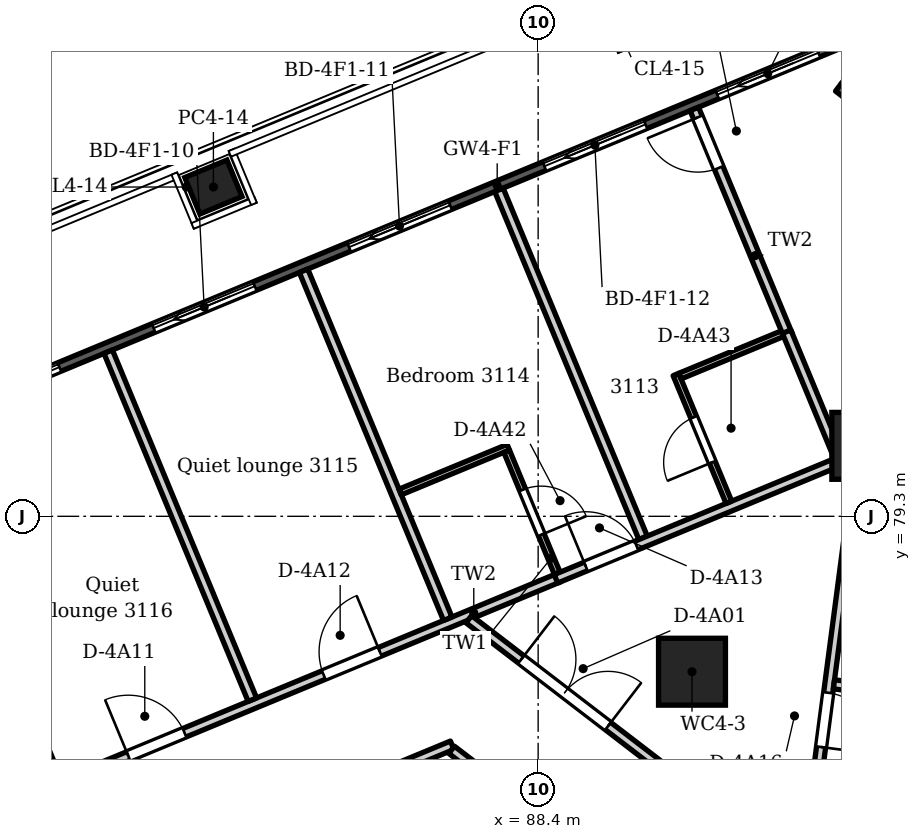
"""IFC4 building model, lengths in metres.
Left out: names, types, materials, properties, quantities, classifications, styles, units other than length and angle.
Written with IfcOpenShell. Run it as: python <this file> out.ifc"""

import sys

from ifc_helpers import new_model, si_unit, direction, frame, frame_2d, origin, origin_2d, place, context, subcontext, project, spatial, polyline, rectangle, circle, outline, extrude, element, fill, save


model = new_model("IFC4")
c1 = context("Model", 3, precision=1e-05, world=origin(), true_north=direction((0.0, 1.0)))
c2 = subcontext(c1, "Body", "Model", "MODEL_VIEW")
j1 = project(units=[si_unit("LENGTHUNIT", "METRE"), si_unit("PLANEANGLEUNIT", "RADIAN")], contexts=[c1])
p1 = place(None, origin())
s1 = spatial("IfcSite", under=j1, at=p1, CompositionType="ELEMENT")
p2 = place(p1, origin())
s2 = spatial("IfcBuilding", under=s1, at=p2, CompositionType="ELEMENT")
p3 = place(p2, frame((0.0, 0.0, 124.2)))
s3 = spatial("IfcBuildingStorey", under=s2, at=p3, CompositionType="ELEMENT", Elevation=124.2)
p4 = place(p3, frame((83.06, 84.715, -0.35), z_axis=(0.0, 0.0, 1.0), x_axis=(0.923879532511, 0.382683432365, 0.0)))
e1 = element("IfcColumn", 1, at=p4, inside=s3, PredefinedType="COLUMN", context=c2, shape_type="SweptSolid", body=[
    extrude(rectangle(XDim=0.75, YDim=0.65, at=origin_2d()), origin(), (0.0, 0.0, 1.0), 3.95),
])
for number, where, z_axis, x_axis in (
    (2, (90.93, 76.744, -0.35), (0.0, 0.0, 1.0), (1.0, 0.0, 0.0)),
    (3, (93.78, 80.459, -0.35), (0.0, 0.0, 1.0), (1.0, 0.0, 0.0)),
):
    element("IfcColumn", number, at=place(p3, frame(where, z_axis=z_axis, x_axis=x_axis)), inside=s3, PredefinedType="COLUMN", context=c2, shape_type="SweptSolid", body=[
        extrude(circle(Radius=0.55, at=origin_2d()), origin(), (0.0, 0.0, 1.0), 3.95),
    ])
p5 = place(p3, frame((52.387, 70.1, 0.0), z_axis=(0.0, 0.0, 1.0), x_axis=(0.92388051416, 0.382681062447, 0.0)))
e4 = element("IfcWall", 4, at=p5, inside=s3, PredefinedType="SOLIDWALL", context=c2, shape_type="SweptSolid", body=[
    extrude(outline(polyline([(0.149, 0.075), (0.149, -0.075), (45.057, -0.075), (45.057, 0.075), (0.149, 0.075)])), origin(), (0.0, 0.0, 1.0), 3.3),
])
p6 = place(p5, frame((1.239, 0.0, 0.0)))
e5 = element("IfcOpeningElement", 5, at=p6, cuts=e4, PredefinedType="OPENING", context=c2, shape_type="SweptSolid", body=[
    extrude(rectangle(XDim=1.8, YDim=2.6, at=frame_2d((0.9, 1.3))), frame((0.0, 0.085, 0.0), z_axis=(0.0, -1.0, 0.0), x_axis=(1.0, 0.0, 0.0)), (0.0, 0.0, 1.0), 0.17),
])
p7 = place(p5, frame((4.316, 0.0, 0.0)))
e6 = element("IfcOpeningElement", 6, at=p7, cuts=e4, PredefinedType="OPENING", context=c2, shape_type="SweptSolid", body=[
    extrude(rectangle(XDim=1.8, YDim=2.6, at=frame_2d((0.9, 1.3))), frame((0.0, 0.085, 0.0), z_axis=(0.0, -1.0, 0.0), x_axis=(1.0, 0.0, 0.0)), (0.0, 0.0, 1.0), 0.17),
])
p8 = place(p5, frame((7.793, 0.0, 0.0)))
e7 = element("IfcOpeningElement", 7, at=p8, cuts=e4, PredefinedType="OPENING", context=c2, shape_type="SweptSolid", body=[
    extrude(rectangle(XDim=1.8, YDim=2.6, at=frame_2d((0.9, 1.3))), frame((0.0, 0.085, 0.0), z_axis=(0.0, -1.0, 0.0), x_axis=(1.0, 0.0, 0.0)), (0.0, 0.0, 1.0), 0.17),
])
p9 = place(p5, frame((11.271, 0.0, 0.0)))
e8 = element("IfcOpeningElement", 8, at=p9, cuts=e4, PredefinedType="OPENING", context=c2, shape_type="SweptSolid", body=[
    extrude(rectangle(XDim=1.8, YDim=2.6, at=frame_2d((0.9, 1.3))), frame((0.0, 0.085, 0.0), z_axis=(0.0, -1.0, 0.0), x_axis=(1.0, 0.0, 0.0)), (0.0, 0.0, 1.0), 0.17),
])
p10 = place(p5, frame((14.748, 0.0, 0.0)))
e9 = element("IfcOpeningElement", 9, at=p10, cuts=e4, PredefinedType="OPENING", context=c2, shape_type="SweptSolid", body=[
    extrude(rectangle(XDim=1.8, YDim=2.6, at=frame_2d((0.9, 1.3))), frame((0.0, 0.085, 0.0), z_axis=(0.0, -1.0, 0.0), x_axis=(1.0, 0.0, 0.0)), (0.0, 0.0, 1.0), 0.17),
])
p11 = place(p5, frame((18.226, 0.0, 0.0)))
e10 = element("IfcOpeningElement", 10, at=p11, cuts=e4, PredefinedType="OPENING", context=c2, shape_type="SweptSolid", body=[
    extrude(rectangle(XDim=1.8, YDim=2.6, at=frame_2d((0.9, 1.3))), frame((0.0, 0.085, 0.0), z_axis=(0.0, -1.0, 0.0), x_axis=(1.0, 0.0, 0.0)), (0.0, 0.0, 1.0), 0.17),
])
p12 = place(p5, frame((21.703, 0.0, 0.0)))
e11 = element("IfcOpeningElement", 11, at=p12, cuts=e4, PredefinedType="OPENING", context=c2, shape_type="SweptSolid", body=[
    extrude(rectangle(XDim=1.8, YDim=2.6, at=frame_2d((0.9, 1.3))), frame((0.0, 0.085, 0.0), z_axis=(0.0, -1.0, 0.0), x_axis=(1.0, 0.0, 0.0)), (0.0, 0.0, 1.0), 0.17),
])
p13 = place(p5, frame((25.18, 0.0, 0.0)))
e12 = element("IfcOpeningElement", 12, at=p13, cuts=e4, PredefinedType="OPENING", context=c2, shape_type="SweptSolid", body=[
    extrude(rectangle(XDim=1.8, YDim=2.6, at=frame_2d((0.9, 1.3))), frame((0.0, 0.085, 0.0), z_axis=(0.0, -1.0, 0.0), x_axis=(1.0, 0.0, 0.0)), (0.0, 0.0, 1.0), 0.17),
])
p14 = place(p5, frame((28.658, 0.0, 0.0)))
e13 = element("IfcOpeningElement", 13, at=p14, cuts=e4, PredefinedType="OPENING", context=c2, shape_type="SweptSolid", body=[
    extrude(rectangle(XDim=1.8, YDim=2.6, at=frame_2d((0.9, 1.3))), frame((0.0, 0.085, 0.0), z_axis=(0.0, -1.0, 0.0), x_axis=(1.0, 0.0, 0.0)), (0.0, 0.0, 1.0), 0.17),
])
p15 = place(p5, frame((32.135, 0.0, 0.0)))
e14 = element("IfcOpeningElement", 14, at=p15, cuts=e4, PredefinedType="OPENING", context=c2, shape_type="SweptSolid", body=[
    extrude(rectangle(XDim=1.8, YDim=2.6, at=frame_2d((0.9, 1.3))), frame((0.0, 0.085, 0.0), z_axis=(0.0, -1.0, 0.0), x_axis=(1.0, 0.0, 0.0)), (0.0, 0.0, 1.0), 0.17),
])
p16 = place(p5, frame((35.613, 0.0, 0.0)))
e15 = element("IfcOpeningElement", 15, at=p16, cuts=e4, PredefinedType="OPENING", context=c2, shape_type="SweptSolid", body=[
    extrude(rectangle(XDim=1.8, YDim=2.6, at=frame_2d((0.9, 1.3))), frame((0.0, 0.085, 0.0), z_axis=(0.0, -1.0, 0.0), x_axis=(1.0, 0.0, 0.0)), (0.0, 0.0, 1.0), 0.17),
])
p17 = place(p5, frame((39.09, 0.0, 0.0)))
e16 = element("IfcOpeningElement", 16, at=p17, cuts=e4, PredefinedType="OPENING", context=c2, shape_type="SweptSolid", body=[
    extrude(rectangle(XDim=1.8, YDim=2.6, at=frame_2d((0.9, 1.3))), frame((0.0, 0.085, 0.0), z_axis=(0.0, -1.0, 0.0), x_axis=(1.0, 0.0, 0.0)), (0.0, 0.0, 1.0), 0.17),
])
p18 = place(p5, frame((42.167, 0.0, 0.0)))
e17 = element("IfcOpeningElement", 17, at=p18, cuts=e4, PredefinedType="OPENING", context=c2, shape_type="SweptSolid", body=[
    extrude(rectangle(XDim=1.8, YDim=2.6, at=frame_2d((0.9, 1.3))), frame((0.0, 0.085, 0.0), z_axis=(0.0, -1.0, 0.0), x_axis=(1.0, 0.0, 0.0)), (0.0, 0.0, 1.0), 0.17),
])
p19 = place(p3, frame((94.193, 87.346, 0.0), z_axis=(0.0, 0.0, 1.0), x_axis=(-0.608762998157, -0.793352136239, 0.0)))
e18 = element("IfcWall", 18, at=p19, inside=s3, PredefinedType="SOLIDWALL", context=c2, shape_type="SweptSolid", body=[
    extrude(outline(polyline([(0.149, 0.075), (0.149, -0.075), (1.235, -0.075), (1.235, 0.075), (0.149, 0.075)])), origin(), (0.0, 0.0, 1.0), 3.3),
])
p20 = place(p3, frame((77.532, 73.648, 0.0), z_axis=(0.0, 0.0, 1.0), x_axis=(0.923863379582, 0.382722426659, 0.0)))
e19 = element("IfcWall", 19, at=p20, inside=s3, PredefinedType="PARTITIONING", context=c2, shape_type="SweptSolid", body=[
    extrude(rectangle(XDim=12.139, YDim=0.15, at=frame_2d((6.07, 0.0))), origin(), (0.0, 0.0, 1.0), 3.3),
])
p21 = place(p20, frame((1.116, 0.0, 0.0)))
e20 = element("IfcOpeningElement", 20, at=p21, cuts=e19, PredefinedType="OPENING", context=c2, shape_type="SweptSolid", body=[
    extrude(rectangle(XDim=1.0, YDim=2.1, at=frame_2d((0.5, 1.05))), frame((0.0, 0.085, 0.0), z_axis=(0.0, -1.0, 0.0), x_axis=(1.0, 0.0, 0.0)), (0.0, 0.0, 1.0), 0.17),
])
p22 = place(p20, frame((4.469, 0.0, 0.0)))
e21 = element("IfcOpeningElement", 21, at=p22, cuts=e19, PredefinedType="OPENING", context=c2, shape_type="SweptSolid", body=[
    extrude(rectangle(XDim=1.0, YDim=2.1, at=frame_2d((0.5, 1.05))), frame((0.0, 0.085, 0.0), z_axis=(0.0, -1.0, 0.0), x_axis=(1.0, 0.0, 0.0)), (0.0, 0.0, 1.0), 0.17),
])
p23 = place(p20, frame((7.947, 0.0, 0.0)))
e22 = element("IfcOpeningElement", 22, at=p23, cuts=e19, PredefinedType="OPENING", context=c2, shape_type="SweptSolid", body=[
    extrude(rectangle(XDim=1.0, YDim=2.1, at=frame_2d((0.5, 1.05))), frame((0.0, 0.085, 0.0), z_axis=(0.0, -1.0, 0.0), x_axis=(1.0, 0.0, 0.0)), (0.0, 0.0, 1.0), 0.17),
])
p24 = place(p3, frame((78.117, 80.676, 0.0), z_axis=(0.0, 0.0, 1.0), x_axis=(0.382644207456, -0.923895779025, 0.0)))
e23 = element("IfcWall", 23, at=p24, inside=s3, PredefinedType="PARTITIONING", context=c2, shape_type="SweptSolid", body=[
    extrude(rectangle(XDim=6.194, YDim=0.15, at=frame_2d((3.097, 0.0))), origin(), (0.0, 0.0, 1.0), 3.3),
])
p25 = place(p3, frame((81.329, 82.007, 0.0), z_axis=(0.0, 0.0, 1.0), x_axis=(0.382731197273, -0.923859746192, 0.0)))
e24 = element("IfcWall", 24, at=p25, inside=s3, PredefinedType="PARTITIONING", context=c2, shape_type="SweptSolid", body=[
    extrude(rectangle(XDim=6.195, YDim=0.15, at=frame_2d((3.097, 0.0))), origin(), (0.0, 0.0, 1.0), 3.3),
])
p26 = place(p3, frame((82.5, 73.677, 0.0), z_axis=(0.0, 0.0, 1.0), x_axis=(0.923900404771, 0.382633038384, 0.0)))
e25 = element("IfcWall", 25, at=p26, inside=s3, PredefinedType="PARTITIONING", context=c2, shape_type="SweptSolid", body=[
    extrude(rectangle(XDim=4.856, YDim=0.15, at=frame_2d((2.428, 0.0))), origin(), (0.0, 0.0, 1.0), 3.3),
])
p27 = place(p26, frame((1.94, 0.0, 0.0)))
e26 = element("IfcOpeningElement", 26, at=p27, cuts=e25, PredefinedType="OPENING", context=c2, shape_type="SweptSolid", body=[
    extrude(rectangle(XDim=0.9, YDim=2.1, at=frame_2d((0.45, 1.05))), frame((0.0, 0.085, 0.0), z_axis=(0.0, -1.0, 0.0), x_axis=(1.0, 0.0, 0.0)), (0.0, 0.0, 1.0), 0.17),
])
p28 = place(p3, frame((84.542, 83.338, 0.0), z_axis=(0.0, 0.0, 1.0), x_axis=(0.382778772429, -0.9238400356, 0.0)))
e27 = element("IfcWall", 27, at=p28, inside=s3, PredefinedType="PARTITIONING", context=c2, shape_type="SweptSolid", body=[
    extrude(rectangle(XDim=6.194, YDim=0.15, at=frame_2d((3.097, 0.0))), origin(), (0.0, 0.0, 1.0), 3.3),
])
p29 = place(p3, frame((86.13, 79.7, 0.0), z_axis=(0.0, 0.0, 1.0), x_axis=(0.923967386518, 0.38247126513, 0.0)))
e28 = element("IfcWall", 28, at=p29, inside=s3, PredefinedType="PARTITIONING", context=c2, shape_type="SweptSolid", body=[
    extrude(rectangle(XDim=1.925, YDim=0.1, at=frame_2d((0.963, 0.0))), origin(), (0.0, 0.0, 1.0), 3.3),
])
p30 = place(p3, frame((86.977, 75.46, 0.0), z_axis=(0.0, 0.0, 1.0), x_axis=(0.793436349507, -0.608653234018, 0.0)))
e29 = element("IfcWall", 29, at=p30, inside=s3, PredefinedType="PARTITIONING", context=c2, shape_type="SweptSolid", body=[
    extrude(rectangle(XDim=3.583, YDim=0.15, at=frame_2d((1.792, 0.0))), origin(), (0.0, 0.0, 1.0), 2.7),
])
p31 = place(p3, frame((87.26, 77.607, 0.0), z_axis=(0.0, 0.0, 1.0), x_axis=(0.79336631803, -0.608744515718, 0.0)))
e30 = element("IfcWall", 30, at=p31, inside=s3, PredefinedType="PARTITIONING", context=c2, shape_type="SweptSolid", body=[
    extrude(rectangle(XDim=7.024, YDim=0.15, at=frame_2d((3.512, 0.0))), origin(), (0.0, 0.0, 1.0), 2.7),
])
p32 = place(p31, frame((1.086, 0.0, 0.0)))
e31 = element("IfcOpeningElement", 31, at=p32, cuts=e30, PredefinedType="OPENING", context=c2, shape_type="SweptSolid", body=[
    extrude(rectangle(XDim=1.8, YDim=2.1, at=frame_2d((0.9, 1.05))), frame((0.0, 0.085, 0.0), z_axis=(0.0, -1.0, 0.0), x_axis=(1.0, 0.0, 0.0)), (0.0, 0.0, 1.0), 0.17),
])
p33 = place(p3, frame((87.755, 84.668, 0.0), z_axis=(0.0, 0.0, 1.0), x_axis=(0.382666303598, -0.923886627293, 0.0)))
e32 = element("IfcWall", 32, at=p33, inside=s3, PredefinedType="PARTITIONING", context=c2, shape_type="SweptSolid", body=[
    extrude(rectangle(XDim=6.193, YDim=0.15, at=frame_2d((3.097, 0.0))), origin(), (0.0, 0.0, 1.0), 3.3),
])
p34 = place(p3, frame((87.882, 80.371, 0.0), z_axis=(0.0, 0.0, 1.0), x_axis=(0.382645891508, -0.92389508155, 0.0)))
e33 = element("IfcWall", 33, at=p34, inside=s3, PredefinedType="PARTITIONING", context=c2, shape_type="SweptSolid", body=[
    extrude(rectangle(XDim=2.175, YDim=0.1, at=frame_2d((1.087, 0.0))), origin(), (0.0, 0.0, 1.0), 3.3),
])
p35 = place(p34, frame((0.688, 0.0, 0.0)))
e34 = element("IfcOpeningElement", 34, at=p35, cuts=e33, PredefinedType="OPENING", context=c2, shape_type="SweptSolid", body=[
    extrude(rectangle(XDim=0.8, YDim=2.1, at=frame_2d((0.4, 1.05))), frame((0.0, 0.06, 0.0), z_axis=(0.0, -1.0, 0.0), x_axis=(1.0, 0.0, 0.0)), (0.0, 0.0, 1.0), 0.12),
])
p36 = place(p3, frame((88.693, 78.272, 0.0), z_axis=(0.0, 0.0, 1.0), x_axis=(0.92395946552, 0.382490399978, 0.0)))
e35 = element("IfcWall", 35, at=p36, inside=s3, PredefinedType="PARTITIONING", context=c2, shape_type="SweptSolid", body=[
    extrude(rectangle(XDim=5.134, YDim=0.15, at=frame_2d((2.567, 0.0))), origin(), (0.0, 0.0, 1.0), 2.8),
])
p37 = place(p36, frame((0.531, 0.0, 0.0)))
e36 = element("IfcOpeningElement", 36, at=p37, cuts=e35, PredefinedType="OPENING", context=c2, shape_type="SweptSolid", body=[
    extrude(rectangle(XDim=0.9, YDim=2.1, at=frame_2d((0.45, 1.05))), frame((0.0, 0.085, 0.0), z_axis=(0.0, -1.0, 0.0), x_axis=(1.0, 0.0, 0.0)), (0.0, 0.0, 1.0), 0.17),
])
p38 = place(p3, frame((90.666, 81.632, 0.0), z_axis=(0.0, 0.0, 1.0), x_axis=(0.382595073996, -0.923916126796, 0.0)))
e37 = element("IfcWall", 37, at=p38, inside=s3, PredefinedType="PARTITIONING", context=c2, shape_type="SweptSolid", body=[
    extrude(rectangle(XDim=2.275, YDim=0.1, at=frame_2d((1.137, 0.0))), origin(), (0.0, 0.0, 1.0), 3.3),
])
p39 = place(p38, frame((0.763, 0.0, 0.0)))
e38 = element("IfcOpeningElement", 38, at=p39, cuts=e37, PredefinedType="OPENING", context=c2, shape_type="SweptSolid", body=[
    extrude(rectangle(XDim=0.8, YDim=2.1, at=frame_2d((0.4, 1.05))), frame((0.0, 0.06, 0.0), z_axis=(0.0, -1.0, 0.0), x_axis=(1.0, 0.0, 0.0)), (0.0, 0.0, 1.0), 0.12),
])
p40 = place(p3, frame((90.731, 81.605, 0.0), z_axis=(0.0, 0.0, 1.0), x_axis=(0.923945120737, 0.382525049986, 0.0)))
e39 = element("IfcWall", 39, at=p40, inside=s3, PredefinedType="PARTITIONING", context=c2, shape_type="SweptSolid", body=[
    extrude(rectangle(XDim=1.825, YDim=0.1, at=frame_2d((0.913, 0.0))), origin(), (0.0, 0.0, 1.0), 3.3),
])
p41 = place(p3, frame((90.968, 85.999, 0.0), z_axis=(0.0, 0.0, 1.0), x_axis=(0.382692977479, -0.923875578738, 0.0)))
e40 = element("IfcWall", 40, at=p41, inside=s3, PredefinedType="PARTITIONING", context=c2, shape_type="SweptSolid", body=[
    extrude(rectangle(XDim=4.024, YDim=0.15, at=frame_2d((2.012, 0.0))), origin(), (0.0, 0.0, 1.0), 3.3),
])
p42 = place(p41, frame((0.15, 0.0, 0.0)))
e41 = element("IfcOpeningElement", 41, at=p42, cuts=e40, PredefinedType="OPENING", context=c2, shape_type="SweptSolid", body=[
    extrude(rectangle(XDim=0.9, YDim=2.1, at=frame_2d((0.45, 1.05))), frame((0.0, 0.085, 0.0), z_axis=(0.0, -1.0, 0.0), x_axis=(1.0, 0.0, 0.0)), (0.0, 0.0, 1.0), 0.17),
])
p43 = place(p3, frame((92.486, 82.336, 0.0), z_axis=(0.0, 0.0, 1.0), x_axis=(0.382374366103, -0.924007491391, 0.0)))
e42 = element("IfcWall", 42, at=p43, inside=s3, PredefinedType="PARTITIONING", context=c2, shape_type="SweptSolid", body=[
    extrude(rectangle(XDim=2.229, YDim=0.15, at=frame_2d((1.115, 0.0))), origin(), (0.0, 0.0, 1.0), 3.3),
])
p44 = place(p3, frame((92.983, 74.979, 0.0), z_axis=(0.0, 0.0, 1.0), x_axis=(0.130587368937, 0.991436805386, 0.0)))
e43 = element("IfcWall", 43, at=p44, inside=s3, PredefinedType="PARTITIONING", context=c2, shape_type="SweptSolid", body=[
    extrude(rectangle(XDim=5.134, YDim=0.15, at=frame_2d((2.567, 0.0))), origin(), (0.0, 0.0, 1.0), 2.8),
])
p45 = place(p44, frame((0.532, 0.0, 0.0)))
e44 = element("IfcOpeningElement", 44, at=p45, cuts=e43, PredefinedType="OPENING", context=c2, shape_type="SweptSolid", body=[
    extrude(rectangle(XDim=0.9, YDim=2.1, at=frame_2d((0.45, 1.05))), frame((0.0, 0.085, 0.0), z_axis=(0.0, -1.0, 0.0), x_axis=(1.0, 0.0, 0.0)), (0.0, 0.0, 1.0), 0.17),
])
p46 = place(p3, frame((93.264, 76.537, 0.0), z_axis=(0.0, 0.0, 1.0), x_axis=(0.991439668145, -0.130565632649, 0.0)))
e45 = element("IfcWall", 45, at=p46, inside=s3, PredefinedType="PARTITIONING", context=c2, shape_type="SweptSolid", body=[
    extrude(rectangle(XDim=6.195, YDim=0.15, at=frame_2d((3.097, 0.0))), origin(), (0.0, 0.0, 1.0), 3.3),
])
p47 = place(p14, origin())
e46 = element("IfcDoor", 46, at=p47, inside=s3, OperationType="SLIDING_TO_LEFT", PredefinedType="DOOR", context=c2, shape_type="SweptSolid", body=[
    extrude(rectangle(XDim=1.8, YDim=2.6, at=frame_2d((0.9, 1.3))), frame((0.0, 0.025, 0.0), z_axis=(0.0, -1.0, 0.0), x_axis=(1.0, 0.0, 0.0)), (0.0, 0.0, 1.0), 0.05),
])
fill(e13, e46)
p48 = place(p15, origin())
e47 = element("IfcDoor", 47, at=p48, inside=s3, OperationType="SLIDING_TO_LEFT", PredefinedType="DOOR", context=c2, shape_type="SweptSolid", body=[
    extrude(rectangle(XDim=1.8, YDim=2.6, at=frame_2d((0.9, 1.3))), frame((0.0, 0.025, 0.0), z_axis=(0.0, -1.0, 0.0), x_axis=(1.0, 0.0, 0.0)), (0.0, 0.0, 1.0), 0.05),
])
fill(e14, e47)
p49 = place(p16, origin())
e48 = element("IfcDoor", 48, at=p49, inside=s3, OperationType="SLIDING_TO_LEFT", PredefinedType="DOOR", context=c2, shape_type="SweptSolid", body=[
    extrude(rectangle(XDim=1.8, YDim=2.6, at=frame_2d((0.9, 1.3))), frame((0.0, 0.025, 0.0), z_axis=(0.0, -1.0, 0.0), x_axis=(1.0, 0.0, 0.0)), (0.0, 0.0, 1.0), 0.05),
])
fill(e15, e48)
p50 = place(p17, origin())
e49 = element("IfcDoor", 49, at=p50, inside=s3, OperationType="SLIDING_TO_LEFT", PredefinedType="DOOR", context=c2, shape_type="SweptSolid", body=[
    extrude(rectangle(XDim=1.8, YDim=2.6, at=frame_2d((0.9, 1.3))), frame((0.0, 0.025, 0.0), z_axis=(0.0, -1.0, 0.0), x_axis=(1.0, 0.0, 0.0)), (0.0, 0.0, 1.0), 0.05),
])
fill(e16, e49)
p51 = place(p18, origin())
e50 = element("IfcDoor", 50, at=p51, inside=s3, OperationType="SLIDING_TO_LEFT", PredefinedType="DOOR", context=c2, shape_type="SweptSolid", body=[
    extrude(rectangle(XDim=1.8, YDim=2.6, at=frame_2d((0.9, 1.3))), frame((0.0, 0.025, 0.0), z_axis=(0.0, -1.0, 0.0), x_axis=(1.0, 0.0, 0.0)), (0.0, 0.0, 1.0), 0.05),
])
fill(e17, e50)
p52 = place(p32, origin())
e51 = element("IfcDoor", 51, at=p52, inside=s3, OperationType="DOUBLE_DOOR_DOUBLE_SWING", PredefinedType="DOOR", context=c2, shape_type="SweptSolid", body=[
    extrude(rectangle(XDim=1.8, YDim=2.1, at=frame_2d((0.9, 1.05))), frame((0.0, 0.025, 0.0), z_axis=(0.0, -1.0, 0.0), x_axis=(1.0, 0.0, 0.0)), (0.0, 0.0, 1.0), 0.05),
])
fill(e31, e51)
p53 = place(p22, origin())
e52 = element("IfcDoor", 52, at=p53, inside=s3, OperationType="SINGLE_SWING_LEFT", PredefinedType="DOOR", context=c2, shape_type="SweptSolid", body=[
    extrude(rectangle(XDim=1.0, YDim=2.1, at=frame_2d((0.5, 1.05))), frame((0.0, 0.025, 0.0), z_axis=(0.0, -1.0, 0.0), x_axis=(1.0, 0.0, 0.0)), (0.0, 0.0, 1.0), 0.05),
])
fill(e21, e52)
p54 = place(p23, origin())
e53 = element("IfcDoor", 53, at=p54, inside=s3, OperationType="SINGLE_SWING_RIGHT", PredefinedType="DOOR", context=c2, shape_type="SweptSolid", body=[
    extrude(rectangle(XDim=1.0, YDim=2.1, at=frame_2d((0.5, 1.05))), frame((0.0, 0.025, 0.0), z_axis=(0.0, -1.0, 0.0), x_axis=(1.0, 0.0, 0.0)), (0.0, 0.0, 1.0), 0.05),
])
fill(e22, e53)
p55 = place(p37, origin())
e54 = element("IfcDoor", 54, at=p55, inside=s3, OperationType="SINGLE_SWING_LEFT", PredefinedType="DOOR", context=c2, shape_type="SweptSolid", body=[
    extrude(rectangle(XDim=0.9, YDim=2.1, at=frame_2d((0.45, 1.05))), frame((0.0, 0.025, 0.0), z_axis=(0.0, -1.0, 0.0), x_axis=(1.0, 0.0, 0.0)), (0.0, 0.0, 1.0), 0.05),
])
fill(e36, e54)
p56 = place(p42, frame((0.9, 0.0, 0.0), z_axis=(0.0, 0.0, 1.0), x_axis=(-1.0, 0.0, 0.0)))
e55 = element("IfcDoor", 55, at=p56, inside=s3, OperationType="SINGLE_SWING_RIGHT", PredefinedType="DOOR", context=c2, shape_type="SweptSolid", body=[
    extrude(rectangle(XDim=0.9, YDim=2.1, at=frame_2d((0.45, 1.05))), frame((0.0, 0.025, 0.0), z_axis=(0.0, -1.0, 0.0), x_axis=(1.0, 0.0, 0.0)), (0.0, 0.0, 1.0), 0.05),
])
fill(e41, e55)
p57 = place(p45, frame((0.9, 0.0, 0.0), z_axis=(0.0, 0.0, 1.0), x_axis=(-1.0, 0.0, 0.0)))
e56 = element("IfcDoor", 56, at=p57, inside=s3, OperationType="SINGLE_SWING_RIGHT", PredefinedType="DOOR", context=c2, shape_type="SweptSolid", body=[
    extrude(rectangle(XDim=0.9, YDim=2.1, at=frame_2d((0.45, 1.05))), frame((0.0, 0.025, 0.0), z_axis=(0.0, -1.0, 0.0), x_axis=(1.0, 0.0, 0.0)), (0.0, 0.0, 1.0), 0.05),
])
fill(e44, e56)
p58 = place(p35, origin())
e57 = element("IfcDoor", 57, at=p58, inside=s3, OperationType="SINGLE_SWING_RIGHT", PredefinedType="DOOR", context=c2, shape_type="SweptSolid", body=[
    extrude(rectangle(XDim=0.8, YDim=2.1, at=frame_2d((0.4, 1.05))), frame((0.0, 0.025, 0.0), z_axis=(0.0, -1.0, 0.0), x_axis=(1.0, 0.0, 0.0)), (0.0, 0.0, 1.0), 0.05),
])
fill(e34, e57)
p59 = place(p39, frame((0.8, 0.0, 0.0), z_axis=(0.0, 0.0, 1.0), x_axis=(-1.0, 0.0, 0.0)))
e58 = element("IfcDoor", 58, at=p59, inside=s3, OperationType="SINGLE_SWING_LEFT", PredefinedType="DOOR", context=c2, shape_type="SweptSolid", body=[
    extrude(rectangle(XDim=0.8, YDim=2.1, at=frame_2d((0.4, 1.05))), frame((0.0, 0.025, 0.0), z_axis=(0.0, -1.0, 0.0), x_axis=(1.0, 0.0, 0.0)), (0.0, 0.0, 1.0), 0.05),
])
fill(e38, e58)
save(model, sys.argv[1])
